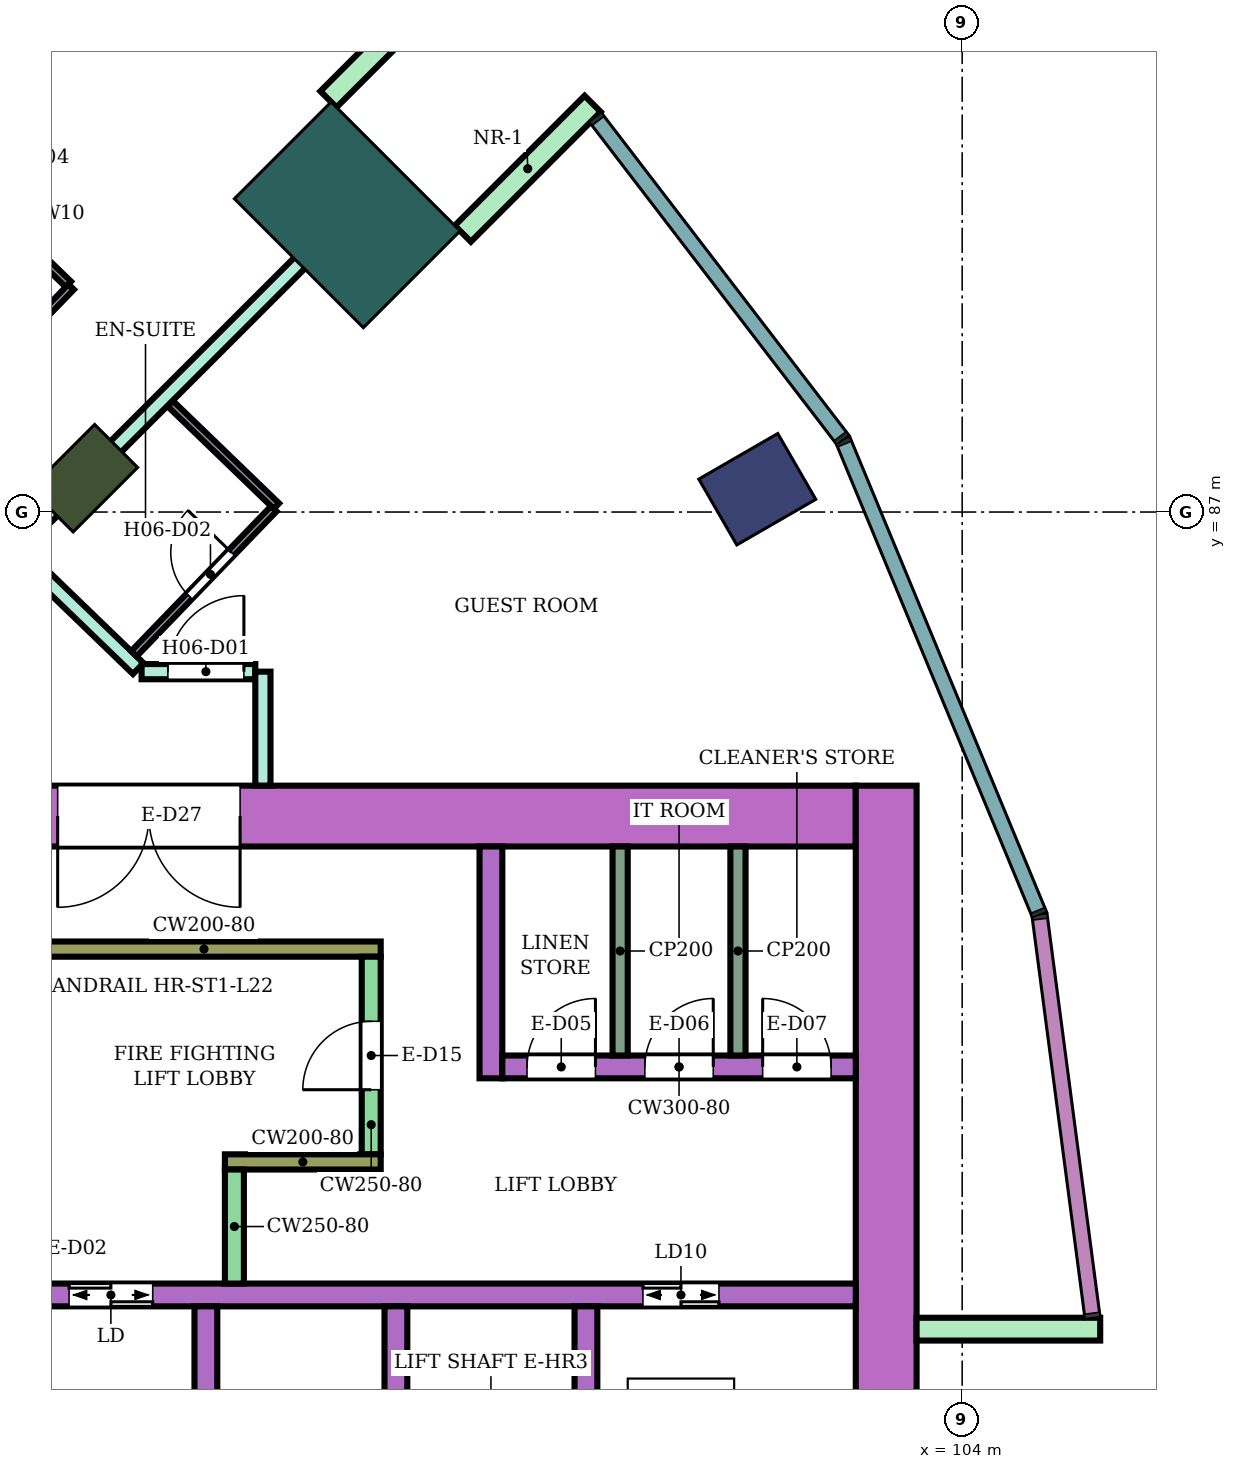
"""IFC4 building model, lengths in metres.
Left out: names, types, materials, properties, quantities, classifications, styles, units other than length and angle.
Written with IfcOpenShell. Run it as: python <this file> out.ifc"""

import sys

from ifc_helpers import new_model, si_unit, direction, frame, frame_2d, origin, origin_2d, place, context, subcontext, project, spatial, rectangle, extrude, element, fill, save


model = new_model("IFC4")
c1 = context("Model", 3, precision=1e-05, world=origin(), true_north=direction((0.0, 1.0)))
c2 = subcontext(c1, "Body", "Model", "MODEL_VIEW")
j1 = project(units=[si_unit("LENGTHUNIT", "METRE"), si_unit("PLANEANGLEUNIT", "RADIAN")], contexts=[c1])
p1 = place(None, origin())
s1 = spatial("IfcSite", under=j1, at=p1, CompositionType="ELEMENT")
p2 = place(p1, origin())
s2 = spatial("IfcBuilding", under=s1, at=p2, CompositionType="ELEMENT")
p3 = place(p2, frame((0.0, 0.0, 97.6)))
s3 = spatial("IfcBuildingStorey", under=s2, at=p3, CompositionType="ELEMENT", Elevation=97.6)
p4 = place(p3, frame((101.304, 87.3, 0.0), z_axis=(0.0, 0.0, 1.0), x_axis=(0.866025403784, 0.5, 0.0)))
e1 = element("IfcColumn", 1, at=p4, inside=s3, PredefinedType="COLUMN", context=c2, shape_type="SweptSolid", body=[
    extrude(rectangle(XDim=1.2, YDim=1.0, at=origin_2d()), origin(), (0.0, 0.0, 1.0), 3.8),
])
p5 = place(p3, frame((92.445, 87.445, 0.0), z_axis=(0.0, 0.0, 1.0), x_axis=(0.707106781187, 0.707106781187, 0.0)))
e2 = element("IfcColumn", 2, at=p5, inside=s3, PredefinedType="COLUMN", context=c2, shape_type="SweptSolid", body=[
    extrude(rectangle(XDim=1.2, YDim=0.8, at=origin_2d()), origin(), (0.0, 0.0, 1.0), 3.8),
])
p6 = place(p3, frame((95.91, 90.91, 0.0), z_axis=(0.0, 0.0, 1.0), x_axis=(0.707106781187, 0.707106781187, 0.0)))
e3 = element("IfcColumn", 3, at=p6, inside=s3, PredefinedType="COLUMN", context=c2, shape_type="SweptSolid", body=[
    extrude(rectangle(XDim=1.8, YDim=2.4, at=origin_2d()), origin(), (0.0, 0.0, 1.0), 3.8),
])
p7 = place(p3, frame((87.9, 83.0, 0.0), z_axis=(0.0, 0.0, 1.0), x_axis=(1.0, 0.0, 0.0)))
e4 = element("IfcWall", 4, at=p7, inside=s3, PredefinedType="SHEAR", context=c2, shape_type="SweptSolid", body=[
    extrude(rectangle(XDim=14.7, YDim=0.8, at=frame_2d((7.35, 0.0))), origin(), (0.0, 0.0, 1.0), 3.48),
])
p8 = place(p7, frame((4.2, 0.0, 0.0)))
e5 = element("IfcOpeningElement", 5, at=p8, cuts=e4, PredefinedType="OPENING", context=c2, shape_type="SweptSolid", body=[
    extrude(rectangle(XDim=2.4, YDim=2.4, at=frame_2d((1.2, 1.2))), frame((0.0, 0.41, 0.0), z_axis=(0.0, -1.0, 0.0), x_axis=(1.0, 0.0, 0.0)), (0.0, 0.0, 1.0), 0.82),
])
p9 = place(p3, frame((103.0, 66.6, 0.0), z_axis=(0.0, 0.0, 1.0), x_axis=(0.0, 1.0, 0.0)))
e6 = element("IfcWall", 6, at=p9, inside=s3, PredefinedType="SHEAR", context=c2, shape_type="SweptSolid", body=[
    extrude(rectangle(XDim=16.8, YDim=0.8, at=frame_2d((8.4, 0.0))), origin(), (0.0, 0.0, 1.0), 3.48),
])
p10 = place(p3, frame((91.7, 76.7, 0.0), z_axis=(0.0, 0.0, 1.0), x_axis=(1.0, 0.0, 0.0)))
e7 = element("IfcWall", 7, at=p10, inside=s3, PredefinedType="SHEAR", context=c2, shape_type="SweptSolid", body=[
    extrude(rectangle(XDim=10.9, YDim=0.3, at=frame_2d((5.45, 0.0))), origin(), (0.0, 0.0, 1.0), 3.48),
])
p11 = place(p10, frame((0.55, 0.0, 0.0)))
e8 = element("IfcOpeningElement", 8, at=p11, cuts=e7, PredefinedType="OPENING", context=c2, shape_type="SweptSolid", body=[
    extrude(rectangle(XDim=1.1, YDim=2.1, at=frame_2d((0.55, 1.05))), frame((0.0, 0.16, 0.0), z_axis=(0.0, -1.0, 0.0), x_axis=(1.0, 0.0, 0.0)), (0.0, 0.0, 1.0), 0.32),
])
p12 = place(p10, frame((8.1, 0.0, 0.0)))
e9 = element("IfcOpeningElement", 9, at=p12, cuts=e7, PredefinedType="OPENING", context=c2, shape_type="SweptSolid", body=[
    extrude(rectangle(XDim=1.0, YDim=2.1, at=frame_2d((0.5, 1.05))), frame((0.0, 0.16, 0.0), z_axis=(0.0, -1.0, 0.0), x_axis=(1.0, 0.0, 0.0)), (0.0, 0.0, 1.0), 0.32),
])
for number, where, z_axis, x_axis in (
    (10, (94.05, 74.0, 0.0), (0.0, 0.0, 1.0), (0.0, 1.0, 0.0)),
    (11, (96.55, 74.0, 0.0), (0.0, 0.0, 1.0), (0.0, 1.0, 0.0)),
    (12, (99.05, 74.0, 0.0), (0.0, 0.0, 1.0), (0.0, 1.0, 0.0)),
):
    element("IfcWall", number, at=place(p3, frame(where, z_axis=z_axis, x_axis=x_axis)), inside=s3, PredefinedType="SHEAR", context=c2, shape_type="SweptSolid", body=[
        extrude(rectangle(XDim=2.55, YDim=0.3, at=frame_2d((1.275, 0.0))), origin(), (0.0, 0.0, 1.0), 3.48),
    ])
p13 = place(p3, frame((91.7, 81.25, 0.0), z_axis=(0.0, 0.0, 1.0), x_axis=(1.0, 0.0, 0.0)))
e13 = element("IfcWall", 13, at=p13, inside=s3, PredefinedType="SHEAR", context=c2, shape_type="SweptSolid", body=[
    extrude(rectangle(XDim=4.65, YDim=0.2, at=frame_2d((2.325, 0.0))), origin(), (0.0, 0.0, 1.0), 3.48),
])
p14 = place(p3, frame((96.225, 78.55, 0.0), z_axis=(0.0, 0.0, 1.0), x_axis=(0.0, 1.0, 0.0)))
e14 = element("IfcWall", 14, at=p14, inside=s3, PredefinedType="SHEAR", context=c2, shape_type="SweptSolid", body=[
    extrude(rectangle(XDim=2.6, YDim=0.25, at=frame_2d((1.3, 0.0))), origin(), (0.0, 0.0, 1.0), 3.48),
])
p15 = place(p14, frame((0.85, 0.0, 0.0)))
e15 = element("IfcOpeningElement", 15, at=p15, cuts=e14, PredefinedType="OPENING", context=c2, shape_type="SweptSolid", body=[
    extrude(rectangle(XDim=0.9, YDim=2.1, at=frame_2d((0.45, 1.05))), frame((0.0, 0.135, 0.0), z_axis=(0.0, -1.0, 0.0), x_axis=(1.0, 0.0, 0.0)), (0.0, 0.0, 1.0), 0.27),
])
p16 = place(p3, frame((94.3, 78.45, 0.0), z_axis=(0.0, 0.0, 1.0), x_axis=(1.0, 0.0, 0.0)))
e16 = element("IfcWall", 16, at=p16, inside=s3, PredefinedType="SHEAR", context=c2, shape_type="SweptSolid", body=[
    extrude(rectangle(XDim=2.05, YDim=0.2, at=frame_2d((1.025, 0.0))), origin(), (0.0, 0.0, 1.0), 3.48),
])
p17 = place(p3, frame((94.425, 76.85, 0.0), z_axis=(0.0, 0.0, 1.0), x_axis=(0.0, 1.0, 0.0)))
e17 = element("IfcWall", 17, at=p17, inside=s3, PredefinedType="SHEAR", context=c2, shape_type="SweptSolid", body=[
    extrude(rectangle(XDim=1.5, YDim=0.25, at=frame_2d((0.75, 0.0))), origin(), (0.0, 0.0, 1.0), 3.48),
])
p18 = place(p3, frame((97.8, 79.55, 0.0), z_axis=(0.0, 0.0, 1.0), x_axis=(0.0, 1.0, 0.0)))
e18 = element("IfcWall", 18, at=p18, inside=s3, PredefinedType="SHEAR", context=c2, shape_type="SweptSolid", body=[
    extrude(rectangle(XDim=3.05, YDim=0.3, at=frame_2d((1.525, 0.0))), origin(), (0.0, 0.0, 1.0), 3.48),
])
p19 = place(p3, frame((97.95, 79.7, 0.0), z_axis=(0.0, 0.0, 1.0), x_axis=(1.0, 0.0, 0.0)))
e19 = element("IfcWall", 19, at=p19, inside=s3, PredefinedType="SHEAR", context=c2, shape_type="SweptSolid", body=[
    extrude(rectangle(XDim=4.65, YDim=0.3, at=frame_2d((2.325, 0.0))), origin(), (0.0, 0.0, 1.0), 3.48),
])
p20 = place(p19, frame((0.325, 0.0, 0.0)))
e20 = element("IfcOpeningElement", 20, at=p20, cuts=e19, PredefinedType="OPENING", context=c2, shape_type="SweptSolid", body=[
    extrude(rectangle(XDim=0.9, YDim=2.1, at=frame_2d((0.45, 1.05))), frame((0.0, 0.16, 0.0), z_axis=(0.0, -1.0, 0.0), x_axis=(1.0, 0.0, 0.0)), (0.0, 0.0, 1.0), 0.32),
])
p21 = place(p19, frame((1.875, 0.0, 0.0)))
e21 = element("IfcOpeningElement", 21, at=p21, cuts=e19, PredefinedType="OPENING", context=c2, shape_type="SweptSolid", body=[
    extrude(rectangle(XDim=0.9, YDim=2.1, at=frame_2d((0.45, 1.05))), frame((0.0, 0.16, 0.0), z_axis=(0.0, -1.0, 0.0), x_axis=(1.0, 0.0, 0.0)), (0.0, 0.0, 1.0), 0.32),
])
p22 = place(p19, frame((3.425, 0.0, 0.0)))
e22 = element("IfcOpeningElement", 22, at=p22, cuts=e19, PredefinedType="OPENING", context=c2, shape_type="SweptSolid", body=[
    extrude(rectangle(XDim=0.9, YDim=2.1, at=frame_2d((0.45, 1.05))), frame((0.0, 0.16, 0.0), z_axis=(0.0, -1.0, 0.0), x_axis=(1.0, 0.0, 0.0)), (0.0, 0.0, 1.0), 0.32),
])
for number, where, z_axis, x_axis in (
    (23, (103.4, 76.25, 0.0), (0.0, 0.0, 1.0), (1.0, 0.0, 0.0)),
    (24, (97.43, 90.662, 0.0), (0.0, 0.0, 1.0), (0.707, 0.707, 0.0)),
    (25, (95.662, 92.43, 0.0), (0.0, 0.0, 1.0), (0.707, 0.707, 0.0)),
):
    element("IfcWall", number, at=place(p3, frame(where, z_axis=z_axis, x_axis=x_axis)), inside=s3, PredefinedType="NOTDEFINED", context=c2, shape_type="SweptSolid", body=[
        extrude(rectangle(XDim=2.416, YDim=0.3, at=frame_2d((1.208, 0.0))), origin(), (0.0, 0.0, 1.0), 3.8),
    ])
p23 = place(p3, frame((88.465, 89.473, 0.0), z_axis=(0.0, 0.0, 1.0), x_axis=(0.719474304909, -0.694519059908, 0.0)))
e26 = element("IfcWall", 26, at=p23, inside=s3, PredefinedType="PARTITIONING", context=c2, shape_type="SweptSolid", body=[
    extrude(rectangle(XDim=6.525, YDim=0.2, at=frame_2d((3.263, 0.0))), origin(), (0.0, 0.0, 1.0), 3.35),
])
p24 = place(p23, frame((2.633, 0.0, 0.0)))
e27 = element("IfcOpeningElement", 27, at=p24, cuts=e26, PredefinedType="OPENING", context=c2, shape_type="SweptSolid", body=[
    extrude(rectangle(XDim=1.1, YDim=2.1, at=frame_2d((0.55, 1.05))), frame((0.0, 0.11, 0.0), z_axis=(0.0, -1.0, 0.0), x_axis=(1.0, 0.0, 0.0)), (0.0, 0.0, 1.0), 0.22),
])
p25 = place(p3, frame((88.4, 89.538, 0.0), z_axis=(0.0, 0.0, 1.0), x_axis=(0.500234695877, 0.865889859648, 0.0)))
e28 = element("IfcWall", 28, at=p25, inside=s3, PredefinedType="PARTITIONING", context=c2, shape_type="SweptSolid", body=[
    extrude(rectangle(XDim=9.007, YDim=0.2, at=frame_2d((4.503, 0.0))), origin(), (0.0, 0.0, 1.0), 3.35),
])
p26 = place(p3, frame((91.595, 86.59, 0.0), z_axis=(0.0, 0.0, 1.0), x_axis=(0.707232337591, 0.706981202484, 0.0)))
e29 = element("IfcWall", 29, at=p26, inside=s3, PredefinedType="PARTITIONING", context=c2, shape_type="SweptSolid", body=[
    extrude(rectangle(XDim=6.805, YDim=0.2, at=frame_2d((3.402, 0.0))), origin(), (0.0, 0.0, 1.0), 3.35),
])
p27 = place(p3, frame((93.204, 84.9, 0.0), z_axis=(0.0, 0.0, 1.0), x_axis=(1.0, 0.0, 0.0)))
e30 = element("IfcWall", 30, at=p27, inside=s3, PredefinedType="PARTITIONING", context=c2, shape_type="SweptSolid", body=[
    extrude(rectangle(XDim=1.496, YDim=0.2, at=frame_2d((0.748, 0.0))), origin(), (0.0, 0.0, 1.0), 3.35),
])
p28 = place(p27, frame((0.346, 0.0, 0.0)))
e31 = element("IfcOpeningElement", 31, at=p28, cuts=e30, PredefinedType="OPENING", context=c2, shape_type="SweptSolid", body=[
    extrude(rectangle(XDim=1.0, YDim=2.1, at=frame_2d((0.5, 1.05))), frame((0.0, 0.11, 0.0), z_axis=(0.0, -1.0, 0.0), x_axis=(1.0, 0.0, 0.0)), (0.0, 0.0, 1.0), 0.22),
])
p29 = place(p3, frame((94.8, 83.401, 0.0), z_axis=(0.0, 0.0, 1.0), x_axis=(0.0, 1.0, 0.0)))
e32 = element("IfcWall", 32, at=p29, inside=s3, PredefinedType="PARTITIONING", context=c2, shape_type="SweptSolid", body=[
    extrude(rectangle(XDim=1.499, YDim=0.2, at=frame_2d((0.75, 0.0))), origin(), (0.0, 0.0, 1.0), 3.35),
])
p30 = place(p3, frame((90.027, 92.134, 0.0), z_axis=(0.0, 0.0, 1.0), x_axis=(0.719415132118, -0.694580353652, 0.0)))
e33 = element("IfcWall", 33, at=p30, inside=s3, PredefinedType="PARTITIONING", context=c2, shape_type="SweptSolid", body=[
    extrude(rectangle(XDim=3.077, YDim=0.1, at=frame_2d((1.539, 0.0))), origin(), (0.0, 0.0, 1.0), 3.35),
])
p31 = place(p30, frame((1.053, 0.0, 0.0)))
e34 = element("IfcOpeningElement", 34, at=p31, cuts=e33, PredefinedType="OPENING", context=c2, shape_type="SweptSolid", body=[
    extrude(rectangle(XDim=0.9, YDim=2.1, at=frame_2d((0.45, 1.05))), frame((0.0, 0.06, 0.0), z_axis=(0.0, -1.0, 0.0), x_axis=(1.0, 0.0, 0.0)), (0.0, 0.0, 1.0), 0.12),
])
p32 = place(p3, frame((90.263, 87.876, 0.0), z_axis=(0.0, 0.0, 1.0), x_axis=(0.694534400859, 0.719459495749, 0.0)))
e35 = element("IfcWall", 35, at=p32, inside=s3, PredefinedType="PARTITIONING", context=c2, shape_type="SweptSolid", body=[
    extrude(rectangle(XDim=2.899, YDim=0.1, at=frame_2d((1.45, 0.0))), origin(), (0.0, 0.0, 1.0), 3.35),
])
p33 = place(p3, frame((93.104, 85.136, 0.0), z_axis=(0.0, 0.0, 1.0), x_axis=(0.694324808789, 0.719661767708, 0.0)))
e36 = element("IfcWall", 36, at=p33, inside=s3, PredefinedType="PARTITIONING", context=c2, shape_type="SweptSolid", body=[
    extrude(rectangle(XDim=2.65, YDim=0.1, at=frame_2d((1.325, 0.0))), origin(), (0.0, 0.0, 1.0), 3.35),
])
p34 = place(p33, frame((1.05, 0.0, 0.0)))
e37 = element("IfcOpeningElement", 37, at=p34, cuts=e36, PredefinedType="OPENING", context=c2, shape_type="SweptSolid", body=[
    extrude(rectangle(XDim=0.8, YDim=2.1, at=frame_2d((0.4, 1.05))), frame((0.0, 0.06, 0.0), z_axis=(0.0, -1.0, 0.0), x_axis=(1.0, 0.0, 0.0)), (0.0, 0.0, 1.0), 0.12),
])
p35 = place(p3, frame((93.582, 88.426, 0.0), z_axis=(0.0, 0.0, 1.0), x_axis=(0.719707242969, -0.694277670977, 0.0)))
e38 = element("IfcWall", 38, at=p35, inside=s3, PredefinedType="PARTITIONING", context=c2, shape_type="SweptSolid", body=[
    extrude(rectangle(XDim=1.939, YDim=0.1, at=frame_2d((0.97, 0.0))), origin(), (0.0, 0.0, 1.0), 3.35),
])
for number, where, z_axis, x_axis in (
    (39, (99.5, 79.85, 0.0), (0.0, 0.0, 1.0), (0.0, 1.0, 0.0)),
    (40, (101.05, 79.85, 0.0), (0.0, 0.0, 1.0), (0.0, 1.0, 0.0)),
):
    element("IfcWall", number, at=place(p3, frame(where, z_axis=z_axis, x_axis=x_axis)), inside=s3, PredefinedType="PARTITIONING", context=c2, shape_type="SweptSolid", body=[
        extrude(rectangle(XDim=2.75, YDim=0.2, at=frame_2d((1.375, 0.0))), origin(), (0.0, 0.0, 1.0), 3.48),
    ])
p36 = place(p28, origin())
e41 = element("IfcDoor", 41, at=p36, inside=s3, OperationType="SINGLE_SWING_RIGHT", PredefinedType="DOOR", context=c2, shape_type="SweptSolid", body=[
    extrude(rectangle(XDim=1.0, YDim=2.1, at=frame_2d((0.5, 1.05))), frame((0.0, 0.025, 0.0), z_axis=(0.0, -1.0, 0.0), x_axis=(1.0, 0.0, 0.0)), (0.0, 0.0, 1.0), 0.05),
])
fill(e31, e41)
p37 = place(p34, origin())
e42 = element("IfcDoor", 42, at=p37, inside=s3, OperationType="SINGLE_SWING_RIGHT", PredefinedType="DOOR", context=c2, shape_type="SweptSolid", body=[
    extrude(rectangle(XDim=0.8, YDim=2.1, at=frame_2d((0.4, 1.05))), frame((0.0, 0.025, 0.0), z_axis=(0.0, -1.0, 0.0), x_axis=(1.0, 0.0, 0.0)), (0.0, 0.0, 1.0), 0.05),
])
fill(e37, e42)
p38 = place(p11, origin())
e43 = element("IfcDoor", 43, at=p38, inside=s3, OperationType="DOUBLE_DOOR_SLIDING", PredefinedType="DOOR", context=c2, shape_type="SweptSolid", body=[
    extrude(rectangle(XDim=1.1, YDim=2.1, at=frame_2d((0.55, 1.05))), frame((0.0, 0.025, 0.0), z_axis=(0.0, -1.0, 0.0), x_axis=(1.0, 0.0, 0.0)), (0.0, 0.0, 1.0), 0.05),
])
fill(e8, e43)
p39 = place(p12, origin())
e44 = element("IfcDoor", 44, at=p39, inside=s3, OperationType="DOUBLE_DOOR_SLIDING", PredefinedType="DOOR", context=c2, shape_type="SweptSolid", body=[
    extrude(rectangle(XDim=1.0, YDim=2.1, at=frame_2d((0.5, 1.05))), frame((0.0, 0.025, 0.0), z_axis=(0.0, -1.0, 0.0), x_axis=(1.0, 0.0, 0.0)), (0.0, 0.0, 1.0), 0.05),
])
fill(e9, e44)
p40 = place(p15, origin())
e45 = element("IfcDoor", 45, at=p40, inside=s3, OperationType="SINGLE_SWING_LEFT", PredefinedType="DOOR", context=c2, shape_type="SweptSolid", body=[
    extrude(rectangle(XDim=0.9, YDim=2.1, at=frame_2d((0.45, 1.05))), frame((0.0, 0.025, 0.0), z_axis=(0.0, -1.0, 0.0), x_axis=(1.0, 0.0, 0.0)), (0.0, 0.0, 1.0), 0.05),
])
fill(e15, e45)
p41 = place(p20, origin())
e46 = element("IfcDoor", 46, at=p41, inside=s3, OperationType="SINGLE_SWING_RIGHT", PredefinedType="DOOR", context=c2, shape_type="SweptSolid", body=[
    extrude(rectangle(XDim=0.9, YDim=2.1, at=frame_2d((0.45, 1.05))), frame((0.0, 0.025, 0.0), z_axis=(0.0, -1.0, 0.0), x_axis=(1.0, 0.0, 0.0)), (0.0, 0.0, 1.0), 0.05),
])
fill(e20, e46)
p42 = place(p21, origin())
e47 = element("IfcDoor", 47, at=p42, inside=s3, OperationType="SINGLE_SWING_RIGHT", PredefinedType="DOOR", context=c2, shape_type="SweptSolid", body=[
    extrude(rectangle(XDim=0.9, YDim=2.1, at=frame_2d((0.45, 1.05))), frame((0.0, 0.025, 0.0), z_axis=(0.0, -1.0, 0.0), x_axis=(1.0, 0.0, 0.0)), (0.0, 0.0, 1.0), 0.05),
])
fill(e21, e47)
p43 = place(p22, origin())
e48 = element("IfcDoor", 48, at=p43, inside=s3, OperationType="SINGLE_SWING_LEFT", PredefinedType="DOOR", context=c2, shape_type="SweptSolid", body=[
    extrude(rectangle(XDim=0.9, YDim=2.1, at=frame_2d((0.45, 1.05))), frame((0.0, 0.025, 0.0), z_axis=(0.0, -1.0, 0.0), x_axis=(1.0, 0.0, 0.0)), (0.0, 0.0, 1.0), 0.05),
])
fill(e22, e48)
p44 = place(p8, frame((2.4, 0.0, 0.0), z_axis=(0.0, 0.0, 1.0), x_axis=(-1.0, 0.0, 0.0)))
e49 = element("IfcDoor", 49, at=p44, inside=s3, OperationType="DOUBLE_DOOR_SINGLE_SWING", PredefinedType="DOOR", context=c2, shape_type="SweptSolid", body=[
    extrude(rectangle(XDim=2.4, YDim=2.4, at=frame_2d((1.2, 1.2))), frame((0.0, 0.025, 0.0), z_axis=(0.0, -1.0, 0.0), x_axis=(1.0, 0.0, 0.0)), (0.0, 0.0, 1.0), 0.05),
])
fill(e5, e49)
save(model, sys.argv[1])
